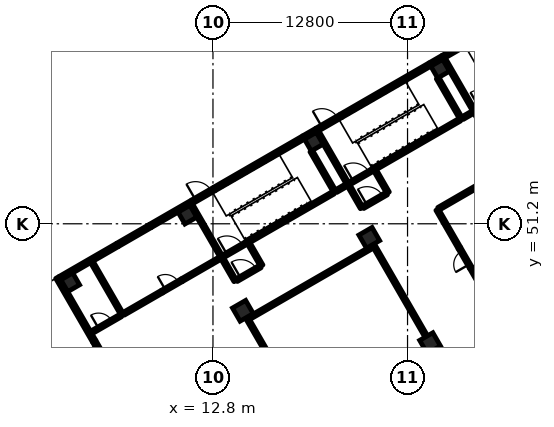
"""IFC4 building model, lengths in metres.
Left out: names, types, materials, properties, quantities, classifications, styles, units other than length and angle.
Written with IfcOpenShell. Run it as: python <this file> out.ifc"""

import sys

from ifc_helpers import new_model, si_unit, direction, frame, frame_2d, origin, origin_2d, place, context, subcontext, project, spatial, rectangle, extrude, element, fill, save


model = new_model("IFC4")
c1 = context("Model", 3, precision=1e-05, world=origin(), true_north=direction((0.0, 1.0)))
c2 = subcontext(c1, "Body", "Model", "MODEL_VIEW")
j1 = project(units=[si_unit("LENGTHUNIT", "METRE"), si_unit("PLANEANGLEUNIT", "RADIAN")], contexts=[c1])
p1 = place(None, origin())
s1 = spatial("IfcSite", under=j1, at=p1, CompositionType="ELEMENT")
p2 = place(p1, origin())
s2 = spatial("IfcBuilding", under=s1, at=p2, CompositionType="ELEMENT")
p3 = place(p2, origin())
s3 = spatial("IfcBuildingStorey", under=s2, at=p3, CompositionType="ELEMENT", Elevation=0.0)
for number, where, z_axis, x_axis in (
    (1, (27.082, 43.349, -0.3), (0.0, 0.0, 1.0), (-0.5, 0.866, 0.0)),
    (2, (14.768, 45.477, -0.3), (0.0, 0.0, 1.0), (-0.5, 0.866, 0.0)),
    (3, (23.082, 50.277, -0.3), (0.0, 0.0, 1.0), (-0.5, 0.866, 0.0)),
):
    element("IfcColumn", number, at=place(p3, frame(where, z_axis=z_axis, x_axis=x_axis)), inside=s3, PredefinedType="COLUMN", context=c2, shape_type="SweptSolid", body=[
        extrude(rectangle(XDim=1.0, YDim=1.0, at=origin_2d()), origin(), (0.0, 0.0, 1.0), 6.3),
    ])
for number, where, z_axis, x_axis in (
    (4, (3.41, 47.349, -0.3), (0.0, 0.0, 1.0), (-0.5, 0.866, 0.0)),
    (5, (11.118, 51.799, -0.3), (0.0, 0.0, 1.0), (-0.5, 0.866, 0.0)),
    (6, (19.432, 56.599, -0.3), (0.0, 0.0, 1.0), (-0.5, 0.866, 0.0)),
    (7, (27.746, 61.399, -0.3), (0.0, 0.0, 1.0), (-0.5, 0.866, 0.0)),
):
    element("IfcColumn", number, at=place(p3, frame(where, z_axis=z_axis, x_axis=x_axis)), inside=s3, PredefinedType="COLUMN", context=c2, shape_type="SweptSolid", body=[
        extrude(rectangle(XDim=0.9, YDim=0.9, at=origin_2d()), origin(), (0.0, 0.0, 1.0), 6.3),
    ])
p4 = place(p3, frame((6.138, 41.476, 0.0), z_axis=(0.0, 0.0, 1.0), x_axis=(-0.500077740698, 0.865980515519, 0.0)))
e8 = element("IfcWall", 8, at=p4, inside=s3, PredefinedType="SOLIDWALL", context=c2, shape_type="SweptSolid", body=[
    extrude(rectangle(XDim=2.3, YDim=0.25, at=frame_2d((1.15, 0.0))), origin(), (0.0, 0.0, 1.0), 5.7),
])
p5 = place(p4, frame((0.25, 0.0, 0.0)))
e9 = element("IfcOpeningElement", 9, at=p5, cuts=e8, PredefinedType="OPENING", context=c2, shape_type="SweptSolid", body=[
    extrude(rectangle(XDim=1.8, YDim=2.1, at=frame_2d((0.9, 1.05))), frame((0.0, 0.135, 0.0), z_axis=(0.0, -1.0, 0.0), x_axis=(1.0, 0.0, 0.0)), (0.0, 0.0, 1.0), 0.27),
])
p6 = place(p3, frame((4.988, 43.467, 0.0), z_axis=(0.0, 0.0, 1.0), x_axis=(-0.500010041276, 0.866019606374, 0.0)))
e10 = element("IfcWall", 10, at=p6, inside=s3, PredefinedType="SOLIDWALL", context=c2, shape_type="SweptSolid", body=[
    extrude(rectangle(XDim=4.85, YDim=0.25, at=frame_2d((2.425, 0.0))), origin(), (0.0, 0.0, 1.0), 5.7),
])
p7 = place(p3, frame((2.733, 47.622, 0.0), z_axis=(0.0, 0.0, 1.0), x_axis=(0.866022959057, 0.500004234368, 0.0)))
e11 = element("IfcWall", 11, at=p7, inside=s3, PredefinedType="SOLIDWALL", context=c2, shape_type="SweptSolid", body=[
    extrude(rectangle(XDim=4.375, YDim=0.25, at=frame_2d((2.188, 0.0))), origin(), (0.0, 0.0, 1.0), 5.7),
])
p8 = place(p3, frame((6.522, 49.809, 0.0), z_axis=(0.0, 0.0, 1.0), x_axis=(0.866022959057, 0.500004234368, 0.0)))
e12 = element("IfcWall", 12, at=p8, inside=s3, PredefinedType="SOLIDWALL", context=c2, shape_type="SweptSolid", body=[
    extrude(rectangle(XDim=2.5, YDim=0.25, at=frame_2d((1.25, 0.0))), origin(), (0.0, 0.0, 1.0), 5.7),
])
p9 = place(p8, frame((0.25, 0.0, 0.3)))
e13 = element("IfcOpeningElement", 13, at=p9, cuts=e12, PredefinedType="OPENING", context=c2, shape_type="SweptSolid", body=[
    extrude(rectangle(XDim=2.0, YDim=2.4, at=frame_2d((1.0, 1.2))), frame((0.0, 0.135, 0.0), z_axis=(0.0, -1.0, 0.0), x_axis=(1.0, 0.0, 0.0)), (0.0, 0.0, 1.0), 0.27),
])
p10 = place(p3, frame((8.687, 51.059, 0.0), z_axis=(0.0, 0.0, 1.0), x_axis=(0.866048579423, 0.499959856469, 0.0)))
e14 = element("IfcWall", 14, at=p10, inside=s3, PredefinedType="SOLIDWALL", context=c2, shape_type="SweptSolid", body=[
    extrude(rectangle(XDim=3.175, YDim=0.25, at=frame_2d((1.587, 0.0))), origin(), (0.0, 0.0, 1.0), 5.7),
])
p11 = place(p3, frame((11.437, 52.647, 0.0), z_axis=(0.0, 0.0, 1.0), x_axis=(0.865989465428, 0.500062241894, 0.0)))
e15 = element("IfcWall", 15, at=p11, inside=s3, PredefinedType="SOLIDWALL", context=c2, shape_type="SweptSolid", body=[
    extrude(rectangle(XDim=1.7, YDim=0.25, at=frame_2d((0.85, 0.0))), origin(), (0.0, 0.0, 1.0), 5.7),
])
p12 = place(p11, frame((0.25, 0.0, 0.0)))
e16 = element("IfcOpeningElement", 16, at=p12, cuts=e15, PredefinedType="OPENING", context=c2, shape_type="SweptSolid", body=[
    extrude(rectangle(XDim=1.2, YDim=2.1, at=frame_2d((0.6, 1.05))), frame((0.0, 0.135, 0.0), z_axis=(0.0, -1.0, 0.0), x_axis=(1.0, 0.0, 0.0)), (0.0, 0.0, 1.0), 0.27),
])
p13 = place(p3, frame((12.909, 53.497, 0.0), z_axis=(0.0, 0.0, 1.0), x_axis=(0.866026575979, 0.499997969693, 0.0)))
e17 = element("IfcWall", 17, at=p13, inside=s3, PredefinedType="SOLIDWALL", context=c2, shape_type="SweptSolid", body=[
    extrude(rectangle(XDim=6.75, YDim=0.25, at=frame_2d((3.375, 0.0))), origin(), (0.0, 0.0, 1.0), 5.7),
])
p14 = place(p3, frame((19.621, 57.372, 0.0), z_axis=(0.0, 0.0, 1.0), x_axis=(0.866000971088, 0.500042316284, 0.0)))
e18 = element("IfcWall", 18, at=p14, inside=s3, PredefinedType="SOLIDWALL", context=c2, shape_type="SweptSolid", body=[
    extrude(rectangle(XDim=1.85, YDim=0.25, at=frame_2d((0.925, 0.0))), origin(), (0.0, 0.0, 1.0), 5.7),
])
p15 = place(p14, frame((0.4, 0.0, 0.0)))
e19 = element("IfcOpeningElement", 19, at=p15, cuts=e18, PredefinedType="OPENING", context=c2, shape_type="SweptSolid", body=[
    extrude(rectangle(XDim=1.2, YDim=2.1, at=frame_2d((0.6, 1.05))), frame((0.0, 0.135, 0.0), z_axis=(0.0, -1.0, 0.0), x_axis=(1.0, 0.0, 0.0)), (0.0, 0.0, 1.0), 0.27),
])
p16 = place(p3, frame((21.223, 58.297, 0.0), z_axis=(0.0, 0.0, 1.0), x_axis=(0.866026575979, 0.499997969693, 0.0)))
e20 = element("IfcWall", 20, at=p16, inside=s3, PredefinedType="SOLIDWALL", context=c2, shape_type="SweptSolid", body=[
    extrude(rectangle(XDim=6.75, YDim=0.25, at=frame_2d((3.375, 0.0))), origin(), (0.0, 0.0, 1.0), 5.7),
])
p17 = place(p3, frame((27.935, 62.172, 0.0), z_axis=(0.0, 0.0, 1.0), x_axis=(0.866091100096, 0.499886193382, 0.0)))
e21 = element("IfcWall", 21, at=p17, inside=s3, PredefinedType="SOLIDWALL", context=c2, shape_type="SweptSolid", body=[
    extrude(rectangle(XDim=1.85, YDim=0.25, at=frame_2d((0.925, 0.0))), origin(), (0.0, 0.0, 1.0), 5.7),
])
p18 = place(p17, frame((0.4, 0.0, 0.0)))
e22 = element("IfcOpeningElement", 22, at=p18, cuts=e21, PredefinedType="OPENING", context=c2, shape_type="SweptSolid", body=[
    extrude(rectangle(XDim=1.2, YDim=2.1, at=frame_2d((0.6, 1.05))), frame((0.0, 0.135, 0.0), z_axis=(0.0, -1.0, 0.0), x_axis=(1.0, 0.0, 0.0)), (0.0, 0.0, 1.0), 0.27),
])
for number, where, z_axis, x_axis in (
    (23, (18.755, 56.872, 0.0), (0.0, 0.0, 1.0), (0.866, 0.5, 0.0)),
    (24, (27.069, 61.672, 0.0), (0.0, 0.0, 1.0), (0.866, 0.5, 0.0)),
):
    element("IfcWall", number, at=place(p3, frame(where, z_axis=z_axis, x_axis=x_axis)), inside=s3, PredefinedType="SOLIDWALL", context=c2, shape_type="SweptSolid", body=[
        extrude(rectangle(XDim=1.0, YDim=0.25, at=frame_2d((0.5, 0.0))), origin(), (0.0, 0.0, 1.0), 5.7),
    ])
p19 = place(p3, frame((13.369, 49.0, 0.0), z_axis=(0.0, 0.0, 1.0), x_axis=(-0.50002537861, 0.866010750942, 0.0)))
e25 = element("IfcWall", 25, at=p19, inside=s3, PredefinedType="SOLIDWALL", context=c2, shape_type="SweptSolid", body=[
    extrude(rectangle(XDim=4.0, YDim=0.2, at=frame_2d((2.0, 0.0))), origin(), (0.0, 0.0, 1.0), 5.7),
])
p20 = place(p3, frame((20.817, 53.299, 0.0), z_axis=(0.0, 0.0, 1.0), x_axis=(-0.49999285859, 0.86602952684, 0.0)))
e26 = element("IfcWall", 26, at=p20, inside=s3, PredefinedType="SOLIDWALL", context=c2, shape_type="SweptSolid", body=[
    extrude(rectangle(XDim=3.1, YDim=0.2, at=frame_2d((1.55, 0.0))), origin(), (0.0, 0.0, 1.0), 5.7),
])
p21 = place(p3, frame((21.683, 53.799, 0.0), z_axis=(0.0, 0.0, 1.0), x_axis=(-0.49999894854, 0.866026010844, 0.0)))
e27 = element("IfcWall", 27, at=p21, inside=s3, PredefinedType="SOLIDWALL", context=c2, shape_type="SweptSolid", body=[
    extrude(rectangle(XDim=4.0, YDim=0.2, at=frame_2d((2.0, 0.0))), origin(), (0.0, 0.0, 1.0), 5.7),
])
p22 = place(p3, frame((29.131, 58.099, 0.0), z_axis=(0.0, 0.0, 1.0), x_axis=(-0.49999285859, 0.86602952684, 0.0)))
e28 = element("IfcWall", 28, at=p22, inside=s3, PredefinedType="SOLIDWALL", context=c2, shape_type="SweptSolid", body=[
    extrude(rectangle(XDim=3.1, YDim=0.2, at=frame_2d((1.55, 0.0))), origin(), (0.0, 0.0, 1.0), 5.7),
])
p23 = place(p3, frame((29.997, 58.599, 0.0), z_axis=(0.0, 0.0, 1.0), x_axis=(-0.49999894854, 0.866026010844, 0.0)))
e29 = element("IfcWall", 29, at=p23, inside=s3, PredefinedType="SOLIDWALL", context=c2, shape_type="SweptSolid", body=[
    extrude(rectangle(XDim=4.0, YDim=0.2, at=frame_2d((2.0, 0.0))), origin(), (0.0, 0.0, 1.0), 5.7),
])
p24 = place(p3, frame((13.456, 49.049, 0.0), z_axis=(0.0, 0.0, 1.0), x_axis=(0.866036909293, 0.499980071345, 0.0)))
e30 = element("IfcWall", 30, at=p24, inside=s3, PredefinedType="SOLIDWALL", context=c2, shape_type="SweptSolid", body=[
    extrude(rectangle(XDim=1.75, YDim=0.2, at=frame_2d((0.875, 0.0))), origin(), (0.0, 0.0, 1.0), 5.7),
])
p25 = place(p24, frame((0.3, 0.0, 0.0)))
e31 = element("IfcOpeningElement", 31, at=p25, cuts=e30, PredefinedType="OPENING", context=c2, shape_type="SweptSolid", body=[
    extrude(rectangle(XDim=1.2, YDim=2.1, at=frame_2d((0.6, 1.05))), frame((0.0, 0.11, 0.0), z_axis=(0.0, -1.0, 0.0), x_axis=(1.0, 0.0, 0.0)), (0.0, 0.0, 1.0), 0.22),
])
p26 = place(p3, frame((14.972, 49.924, 0.0), z_axis=(0.0, 0.0, 1.0), x_axis=(0.86601134256, 0.500024353964, 0.0)))
e32 = element("IfcWall", 32, at=p26, inside=s3, PredefinedType="SOLIDWALL", context=c2, shape_type="SweptSolid", body=[
    extrude(rectangle(XDim=6.65, YDim=0.2, at=frame_2d((3.325, 0.0))), origin(), (0.0, 0.0, 1.0), 5.7),
])
p27 = place(p3, frame((21.77, 53.849, 0.0), z_axis=(0.0, 0.0, 1.0), x_axis=(0.866002029911, 0.500040482552, 0.0)))
e33 = element("IfcWall", 33, at=p27, inside=s3, PredefinedType="SOLIDWALL", context=c2, shape_type="SweptSolid", body=[
    extrude(rectangle(XDim=1.75, YDim=0.2, at=frame_2d((0.875, 0.0))), origin(), (0.0, 0.0, 1.0), 5.7),
])
p28 = place(p27, frame((0.3, 0.0, 0.0)))
e34 = element("IfcOpeningElement", 34, at=p28, cuts=e33, PredefinedType="OPENING", context=c2, shape_type="SweptSolid", body=[
    extrude(rectangle(XDim=1.2, YDim=2.1, at=frame_2d((0.6, 1.05))), frame((0.0, 0.11, 0.0), z_axis=(0.0, -1.0, 0.0), x_axis=(1.0, 0.0, 0.0)), (0.0, 0.0, 1.0), 0.22),
])
p29 = place(p3, frame((23.285, 54.724, 0.0), z_axis=(0.0, 0.0, 1.0), x_axis=(0.866027239912, 0.49999681972, 0.0)))
e35 = element("IfcWall", 35, at=p29, inside=s3, PredefinedType="SOLIDWALL", context=c2, shape_type="SweptSolid", body=[
    extrude(rectangle(XDim=6.65, YDim=0.2, at=frame_2d((3.325, 0.0))), origin(), (0.0, 0.0, 1.0), 5.7),
])
for number, where, z_axis, x_axis in (
    (36, (14.27, 47.441, 0.0), (0.0, 0.0, 1.0), (-0.5, 0.866, 0.0)),
    (37, (16.001, 48.441, 0.0), (0.0, 0.0, 1.0), (-0.5, 0.866, 0.0)),
    (38, (22.583, 52.24, 0.0), (0.0, 0.0, 1.0), (-0.5, 0.866, 0.0)),
):
    element("IfcWall", number, at=place(p3, frame(where, z_axis=z_axis, x_axis=x_axis)), inside=s3, PredefinedType="PARTITIONING", context=c2, shape_type="SweptSolid", body=[
        extrude(rectangle(XDim=1.7, YDim=0.2, at=frame_2d((0.85, 0.0))), origin(), (0.0, 0.0, 1.0), 5.1),
    ])
p30 = place(p3, frame((24.315, 53.24, 0.0), z_axis=(0.0, 0.0, 1.0), x_axis=(-0.500000056704, 0.866025371046, 0.0)))
e39 = element("IfcWall", 39, at=p30, inside=s3, PredefinedType="PARTITIONING", context=c2, shape_type="SweptSolid", body=[
    extrude(rectangle(XDim=1.7, YDim=0.2, at=frame_2d((0.85, 0.0))), origin(), (0.0, 0.0, 1.0), 5.1),
])
p31 = place(p3, frame((30.897, 57.041, 0.0), z_axis=(0.0, 0.0, 1.0), x_axis=(-0.500062241894, 0.865989465428, 0.0)))
e40 = element("IfcWall", 40, at=p31, inside=s3, PredefinedType="PARTITIONING", context=c2, shape_type="SweptSolid", body=[
    extrude(rectangle(XDim=1.7, YDim=0.2, at=frame_2d((0.85, 0.0))), origin(), (0.0, 0.0, 1.0), 5.1),
])
p32 = place(p3, frame((14.356, 47.49, 0.0), z_axis=(0.0, 0.0, 1.0), x_axis=(0.865955154139, 0.50012165622, 0.0)))
e41 = element("IfcWall", 41, at=p32, inside=s3, PredefinedType="PARTITIONING", context=c2, shape_type="SweptSolid", body=[
    extrude(rectangle(XDim=1.8, YDim=0.2, at=frame_2d((0.9, 0.0))), origin(), (0.0, 0.0, 1.0), 5.1),
])
p33 = place(p32, frame((0.3, 0.0, 0.0)))
e42 = element("IfcOpeningElement", 42, at=p33, cuts=e41, PredefinedType="OPENING", context=c2, shape_type="SweptSolid", body=[
    extrude(rectangle(XDim=1.2, YDim=2.1, at=frame_2d((0.6, 1.05))), frame((0.0, 0.11, 0.0), z_axis=(0.0, -1.0, 0.0), x_axis=(1.0, 0.0, 0.0)), (0.0, 0.0, 1.0), 0.22),
])
p34 = place(p3, frame((22.67, 52.291, 0.0), z_axis=(0.0, 0.0, 1.0), x_axis=(0.865989075817, 0.500062916607, 0.0)))
e43 = element("IfcWall", 43, at=p34, inside=s3, PredefinedType="PARTITIONING", context=c2, shape_type="SweptSolid", body=[
    extrude(rectangle(XDim=1.8, YDim=0.2, at=frame_2d((0.9, 0.0))), origin(), (0.0, 0.0, 1.0), 5.1),
])
p35 = place(p34, frame((0.3, 0.0, 0.0)))
e44 = element("IfcOpeningElement", 44, at=p35, cuts=e43, PredefinedType="OPENING", context=c2, shape_type="SweptSolid", body=[
    extrude(rectangle(XDim=1.2, YDim=2.1, at=frame_2d((0.6, 1.05))), frame((0.0, 0.11, 0.0), z_axis=(0.0, -1.0, 0.0), x_axis=(1.0, 0.0, 0.0)), (0.0, 0.0, 1.0), 0.22),
])
p36 = place(p3, frame((6.831, 45.224, 0.0), z_axis=(0.0, 0.0, 1.0), x_axis=(-0.49999894854, 0.866026010844, 0.0)))
e45 = element("IfcWall", 45, at=p36, inside=s3, PredefinedType="PARTITIONING", context=c2, shape_type="SweptSolid", body=[
    extrude(rectangle(XDim=4.0, YDim=0.2, at=frame_2d((2.0, 0.0))), origin(), (0.0, 0.0, 1.0), 5.1),
])
p37 = place(p3, frame((4.796, 44.049, 0.0), z_axis=(0.0, 0.0, 1.0), x_axis=(0.866017533419, 0.500013631625, 0.0)))
e46 = element("IfcWall", 46, at=p37, inside=s3, PredefinedType="PARTITIONING", context=c2, shape_type="SweptSolid", body=[
    extrude(rectangle(XDim=2.25, YDim=0.2, at=frame_2d((1.125, 0.0))), origin(), (0.0, 0.0, 1.0), 5.1),
])
p38 = place(p37, frame((0.55, 0.0, 0.0)))
e47 = element("IfcOpeningElement", 47, at=p38, cuts=e46, PredefinedType="OPENING", context=c2, shape_type="SweptSolid", body=[
    extrude(rectangle(XDim=1.0, YDim=2.1, at=frame_2d((0.5, 1.05))), frame((0.0, 0.11, 0.0), z_axis=(0.0, -1.0, 0.0), x_axis=(1.0, 0.0, 0.0)), (0.0, 0.0, 1.0), 0.22),
])
p39 = place(p3, frame((18.518, 38.982, 0.0), z_axis=(0.0, 0.0, 1.0), x_axis=(-0.500004234368, 0.866022959057, 0.0)))
e48 = element("IfcWall", 48, at=p39, inside=s3, PredefinedType="PARTITIONING", context=c2, shape_type="SweptSolid", body=[
    extrude(rectangle(XDim=6.875, YDim=0.2, at=frame_2d((3.438, 0.0))), origin(), (0.0, 0.0, 1.0), 5.1),
])
p40 = place(p3, frame((26.832, 43.781, 0.0), z_axis=(0.0, 0.0, 1.0), x_axis=(-0.499988857673, 0.866031836714, 0.0)))
e49 = element("IfcWall", 49, at=p40, inside=s3, PredefinedType="PARTITIONING", context=c2, shape_type="SweptSolid", body=[
    extrude(rectangle(XDim=6.875, YDim=0.2, at=frame_2d((3.438, 0.0))), origin(), (0.0, 0.0, 1.0), 5.1),
])
p41 = place(p3, frame((34.664, 39.816, 0.0), z_axis=(0.0, 0.0, 1.0), x_axis=(-0.49999201416, 0.866030014362, 0.0)))
e50 = element("IfcWall", 50, at=p41, inside=s3, PredefinedType="PARTITIONING", context=c2, shape_type="SweptSolid", body=[
    extrude(rectangle(XDim=9.8, YDim=0.2, at=frame_2d((4.9, 0.0))), origin(), (0.0, 0.0, 1.0), 5.1),
])
p42 = place(p3, frame((29.764, 48.303, 0.0), z_axis=(0.0, 0.0, 1.0), x_axis=(-0.500060622324, 0.86599040064, 0.0)))
e51 = element("IfcWall", 51, at=p42, inside=s3, PredefinedType="PARTITIONING", context=c2, shape_type="SweptSolid", body=[
    extrude(rectangle(XDim=1.5, YDim=0.2, at=frame_2d((0.75, 0.0))), origin(), (0.0, 0.0, 1.0), 5.1),
])
p43 = place(p42, frame((0.25, 0.0, 0.0)))
e52 = element("IfcOpeningElement", 52, at=p43, cuts=e51, PredefinedType="OPENING", context=c2, shape_type="SweptSolid", body=[
    extrude(rectangle(XDim=1.0, YDim=2.1, at=frame_2d((0.5, 1.05))), frame((0.0, 0.11, 0.0), z_axis=(0.0, -1.0, 0.0), x_axis=(1.0, 0.0, 0.0)), (0.0, 0.0, 1.0), 0.22),
])
p44 = place(p3, frame((29.014, 49.602, 0.0), z_axis=(0.0, 0.0, 1.0), x_axis=(-0.499963291492, 0.866046596414, 0.0)))
e53 = element("IfcWall", 53, at=p44, inside=s3, PredefinedType="PARTITIONING", context=c2, shape_type="SweptSolid", body=[
    extrude(rectangle(XDim=2.925, YDim=0.2, at=frame_2d((1.462, 0.0))), origin(), (0.0, 0.0, 1.0), 5.1),
])
p45 = place(p3, frame((15.167, 44.986, 0.0), z_axis=(0.0, 0.0, 1.0), x_axis=(0.866027286158, 0.499996739618, 0.0)))
e54 = element("IfcWall", 54, at=p45, inside=s3, PredefinedType="PARTITIONING", context=c2, shape_type="SweptSolid", body=[
    extrude(rectangle(XDim=9.4, YDim=0.2, at=frame_2d((4.7, 0.0))), origin(), (0.0, 0.0, 1.0), 5.1),
])
p46 = place(p3, frame((27.638, 52.186, 0.0), z_axis=(0.0, 0.0, 1.0), x_axis=(0.866023247849, 0.500003734171, 0.0)))
e55 = element("IfcWall", 55, at=p46, inside=s3, PredefinedType="PARTITIONING", context=c2, shape_type="SweptSolid", body=[
    extrude(rectangle(XDim=14.2, YDim=0.2, at=frame_2d((7.1, 0.0))), origin(), (0.0, 0.0, 1.0), 5.1),
])
p47 = place(p3, frame((6.917, 45.274, 0.0), z_axis=(0.0, 0.0, 1.0), x_axis=(0.866046596414, 0.499963291492, 0.0)))
e56 = element("IfcWall", 56, at=p47, inside=s3, PredefinedType="PARTITIONING", context=c2, shape_type="SweptSolid", body=[
    extrude(rectangle(XDim=2.925, YDim=0.2, at=frame_2d((1.462, 0.0))), origin(), (0.0, 0.0, 1.0), 5.1),
])
p48 = place(p3, frame((9.451, 46.737, 0.0), z_axis=(0.0, 0.0, 1.0), x_axis=(0.866031096941, 0.499990139034, 0.0)))
e57 = element("IfcWall", 57, at=p48, inside=s3, PredefinedType="PARTITIONING", context=c2, shape_type="SweptSolid", body=[
    extrude(rectangle(XDim=1.5, YDim=0.2, at=frame_2d((0.75, 0.0))), origin(), (0.0, 0.0, 1.0), 5.1),
])
p49 = place(p48, frame((0.25, 0.0, 0.0)))
e58 = element("IfcOpeningElement", 58, at=p49, cuts=e57, PredefinedType="OPENING", context=c2, shape_type="SweptSolid", body=[
    extrude(rectangle(XDim=1.0, YDim=2.1, at=frame_2d((0.5, 1.05))), frame((0.0, 0.11, 0.0), z_axis=(0.0, -1.0, 0.0), x_axis=(1.0, 0.0, 0.0)), (0.0, 0.0, 1.0), 0.22),
])
p50 = place(p3, frame((10.75, 47.487, 0.0), z_axis=(0.0, 0.0, 1.0), x_axis=(0.86601045545, 0.500025890382, 0.0)))
e59 = element("IfcWall", 59, at=p50, inside=s3, PredefinedType="PARTITIONING", context=c2, shape_type="SweptSolid", body=[
    extrude(rectangle(XDim=2.925, YDim=0.2, at=frame_2d((1.462, 0.0))), origin(), (0.0, 0.0, 1.0), 5.1),
])
p51 = place(p3, frame((20.904, 53.349, 0.0), z_axis=(0.0, 0.0, 1.0), x_axis=(0.865961984968, 0.500109828528, 0.0)))
e60 = element("IfcWall", 60, at=p51, inside=s3, PredefinedType="PARTITIONING", context=c2, shape_type="SweptSolid", body=[
    extrude(rectangle(XDim=0.8, YDim=0.2, at=frame_2d((0.4, 0.0))), origin(), (0.0, 0.0, 1.0), 5.1),
])
p52 = place(p3, frame((29.218, 58.149, 0.0), z_axis=(0.0, 0.0, 1.0), x_axis=(0.866017831539, 0.500013115284, 0.0)))
e61 = element("IfcWall", 61, at=p52, inside=s3, PredefinedType="PARTITIONING", context=c2, shape_type="SweptSolid", body=[
    extrude(rectangle(XDim=0.8, YDim=0.2, at=frame_2d((0.4, 0.0))), origin(), (0.0, 0.0, 1.0), 5.1),
])
p53 = place(p5, origin())
e62 = element("IfcDoor", 62, at=p53, inside=s3, OperationType="DOUBLE_DOOR_SINGLE_SWING", PredefinedType="DOOR", context=c2, shape_type="SweptSolid", body=[
    extrude(rectangle(XDim=1.8, YDim=2.1, at=frame_2d((0.9, 1.05))), frame((0.0, 0.025, 0.0), z_axis=(0.0, -1.0, 0.0), x_axis=(1.0, 0.0, 0.0)), (0.0, 0.0, 1.0), 0.05),
])
fill(e9, e62)
p54 = place(p9, origin())
e63 = element("IfcWindow", 63, at=p54, inside=s3, PartitioningType="SINGLE_PANEL", PredefinedType="WINDOW", context=c2, shape_type="SweptSolid", body=[
    extrude(rectangle(XDim=2.0, YDim=2.4, at=frame_2d((1.0, 1.2))), frame((0.0, 0.03, 0.0), z_axis=(0.0, -1.0, 0.0), x_axis=(1.0, 0.0, 0.0)), (0.0, 0.0, 1.0), 0.06),
])
fill(e13, e63)
p55 = place(p12, origin())
e64 = element("IfcDoor", 64, at=p55, inside=s3, OperationType="SINGLE_SWING_LEFT", PredefinedType="DOOR", context=c2, shape_type="SweptSolid", body=[
    extrude(rectangle(XDim=1.2, YDim=2.1, at=frame_2d((0.6, 1.05))), frame((0.0, 0.025, 0.0), z_axis=(0.0, -1.0, 0.0), x_axis=(1.0, 0.0, 0.0)), (0.0, 0.0, 1.0), 0.05),
])
fill(e16, e64)
p56 = place(p15, origin())
e65 = element("IfcDoor", 65, at=p56, inside=s3, OperationType="SINGLE_SWING_LEFT", PredefinedType="DOOR", context=c2, shape_type="SweptSolid", body=[
    extrude(rectangle(XDim=1.2, YDim=2.1, at=frame_2d((0.6, 1.05))), frame((0.0, 0.025, 0.0), z_axis=(0.0, -1.0, 0.0), x_axis=(1.0, 0.0, 0.0)), (0.0, 0.0, 1.0), 0.05),
])
fill(e19, e65)
p57 = place(p18, origin())
e66 = element("IfcDoor", 66, at=p57, inside=s3, OperationType="SINGLE_SWING_LEFT", PredefinedType="DOOR", context=c2, shape_type="SweptSolid", body=[
    extrude(rectangle(XDim=1.2, YDim=2.1, at=frame_2d((0.6, 1.05))), frame((0.0, 0.025, 0.0), z_axis=(0.0, -1.0, 0.0), x_axis=(1.0, 0.0, 0.0)), (0.0, 0.0, 1.0), 0.05),
])
fill(e22, e66)
p58 = place(p25, origin())
e67 = element("IfcDoor", 67, at=p58, inside=s3, OperationType="SINGLE_SWING_LEFT", PredefinedType="DOOR", context=c2, shape_type="SweptSolid", body=[
    extrude(rectangle(XDim=1.2, YDim=2.1, at=frame_2d((0.6, 1.05))), frame((0.0, 0.025, 0.0), z_axis=(0.0, -1.0, 0.0), x_axis=(1.0, 0.0, 0.0)), (0.0, 0.0, 1.0), 0.05),
])
fill(e31, e67)
p59 = place(p28, origin())
e68 = element("IfcDoor", 68, at=p59, inside=s3, OperationType="SINGLE_SWING_LEFT", PredefinedType="DOOR", context=c2, shape_type="SweptSolid", body=[
    extrude(rectangle(XDim=1.2, YDim=2.1, at=frame_2d((0.6, 1.05))), frame((0.0, 0.025, 0.0), z_axis=(0.0, -1.0, 0.0), x_axis=(1.0, 0.0, 0.0)), (0.0, 0.0, 1.0), 0.05),
])
fill(e34, e68)
p60 = place(p33, origin())
e69 = element("IfcDoor", 69, at=p60, inside=s3, OperationType="SINGLE_SWING_LEFT", PredefinedType="DOOR", context=c2, shape_type="SweptSolid", body=[
    extrude(rectangle(XDim=1.2, YDim=2.1, at=frame_2d((0.6, 1.05))), frame((0.0, 0.025, 0.0), z_axis=(0.0, -1.0, 0.0), x_axis=(1.0, 0.0, 0.0)), (0.0, 0.0, 1.0), 0.05),
])
fill(e42, e69)
p61 = place(p35, origin())
e70 = element("IfcDoor", 70, at=p61, inside=s3, OperationType="SINGLE_SWING_LEFT", PredefinedType="DOOR", context=c2, shape_type="SweptSolid", body=[
    extrude(rectangle(XDim=1.2, YDim=2.1, at=frame_2d((0.6, 1.05))), frame((0.0, 0.025, 0.0), z_axis=(0.0, -1.0, 0.0), x_axis=(1.0, 0.0, 0.0)), (0.0, 0.0, 1.0), 0.05),
])
fill(e44, e70)
p62 = place(p38, origin())
e71 = element("IfcDoor", 71, at=p62, inside=s3, OperationType="SINGLE_SWING_LEFT", PredefinedType="DOOR", context=c2, shape_type="SweptSolid", body=[
    extrude(rectangle(XDim=1.0, YDim=2.1, at=frame_2d((0.5, 1.05))), frame((0.0, 0.025, 0.0), z_axis=(0.0, -1.0, 0.0), x_axis=(1.0, 0.0, 0.0)), (0.0, 0.0, 1.0), 0.05),
])
fill(e47, e71)
p63 = place(p43, origin())
e72 = element("IfcDoor", 72, at=p63, inside=s3, OperationType="SINGLE_SWING_LEFT", PredefinedType="DOOR", context=c2, shape_type="SweptSolid", body=[
    extrude(rectangle(XDim=1.0, YDim=2.1, at=frame_2d((0.5, 1.05))), frame((0.0, 0.025, 0.0), z_axis=(0.0, -1.0, 0.0), x_axis=(1.0, 0.0, 0.0)), (0.0, 0.0, 1.0), 0.05),
])
fill(e52, e72)
p64 = place(p49, origin())
e73 = element("IfcDoor", 73, at=p64, inside=s3, OperationType="SINGLE_SWING_LEFT", PredefinedType="DOOR", context=c2, shape_type="SweptSolid", body=[
    extrude(rectangle(XDim=1.0, YDim=2.1, at=frame_2d((0.5, 1.05))), frame((0.0, 0.025, 0.0), z_axis=(0.0, -1.0, 0.0), x_axis=(1.0, 0.0, 0.0)), (0.0, 0.0, 1.0), 0.05),
])
fill(e58, e73)
save(model, sys.argv[1])
